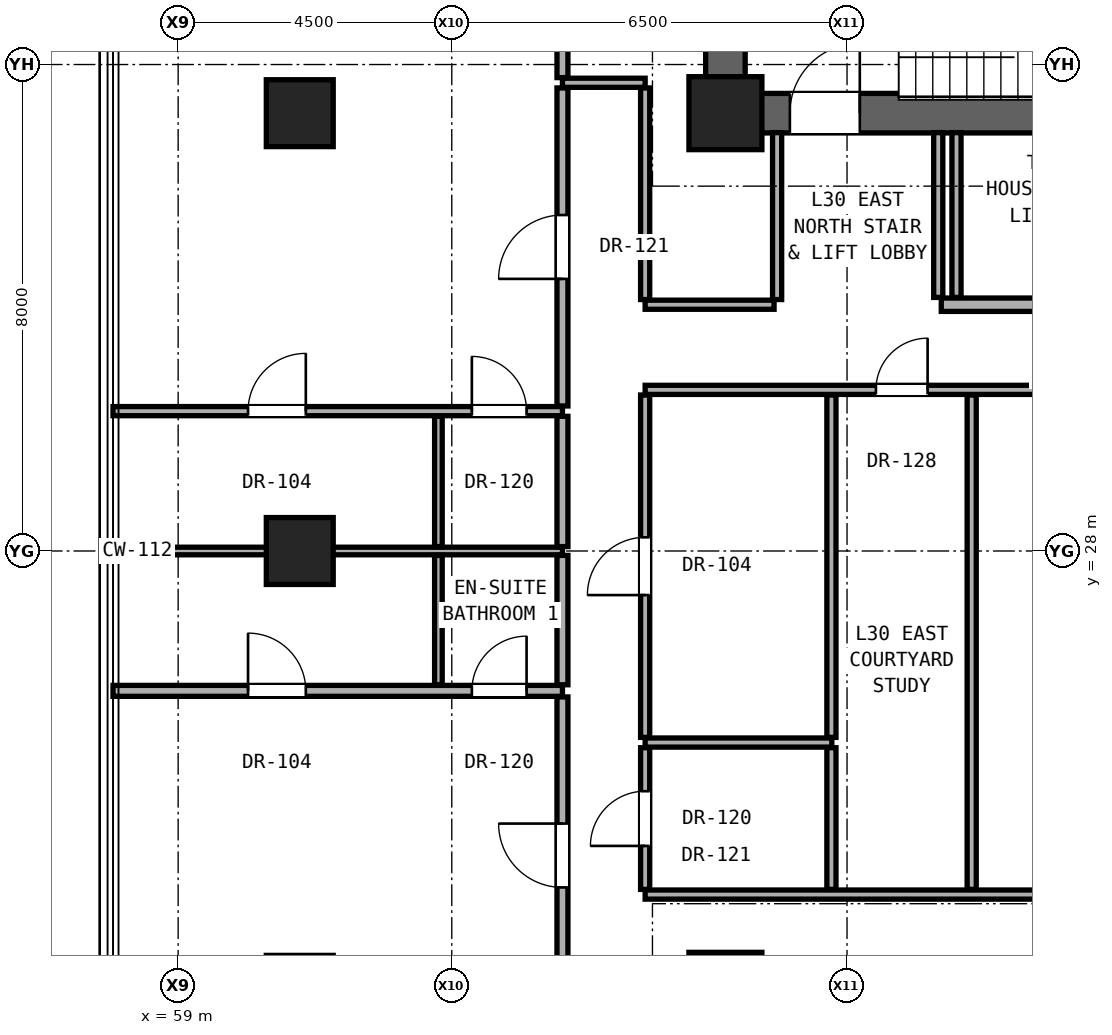
"""IFC4 building model, lengths in metres.
Left out: names, types, materials, properties, quantities, classifications, styles, units other than length and angle.
Written with IfcOpenShell. Run it as: python <this file> out.ifc"""

import sys

from ifc_helpers import new_model, si_unit, direction, frame, frame_2d, origin, origin_2d, place, context, subcontext, project, spatial, rectangle, hollow_rectangle, extrude, element, fill, save


model = new_model("IFC4")
c1 = context("Model", 3, precision=1e-05, world=origin(), true_north=direction((0.0, 1.0)))
c2 = subcontext(c1, "Body", "Model", "MODEL_VIEW")
j1 = project(units=[si_unit("LENGTHUNIT", "METRE"), si_unit("PLANEANGLEUNIT", "RADIAN")], contexts=[c1])
p1 = place(None, origin())
s1 = spatial("IfcSite", under=j1, at=p1, CompositionType="ELEMENT")
p2 = place(p1, origin())
s2 = spatial("IfcBuilding", under=s1, at=p2, CompositionType="ELEMENT")
p3 = place(p2, frame((0.0, 0.0, 108.2)))
s3 = spatial("IfcBuildingStorey", under=s2, at=p3, CompositionType="ELEMENT", Elevation=108.2)
for number, where, z_axis, x_axis in (
    (1, (68.0, 20.8, 0.0), (0.0, 0.0, 1.0), (1.0, 0.0, 0.0)),
    (2, (68.0, 35.2, 0.0), (0.0, 0.0, 1.0), (1.0, 0.0, 0.0)),
):
    element("IfcColumn", number, at=place(p3, frame(where, z_axis=z_axis, x_axis=x_axis)), inside=s3, PredefinedType="COLUMN", context=c2, shape_type="SweptSolid", body=[
        extrude(rectangle(XDim=1.2, YDim=1.2, at=origin_2d()), origin(), (0.0, 0.0, 1.0), 3.3),
    ])
for number, where, z_axis, x_axis in (
    (3, (61.0, 28.0, 0.0), (0.0, 0.0, 1.0), (1.0, 0.0, 0.0)),
    (4, (61.0, 35.2, 0.0), (0.0, 0.0, 1.0), (1.0, 0.0, 0.0)),
):
    element("IfcColumn", number, at=place(p3, frame(where, z_axis=z_axis, x_axis=x_axis)), inside=s3, PredefinedType="COLUMN", context=c2, shape_type="SweptSolid", body=[
        extrude(hollow_rectangle(XDim=1.1, YDim=1.1, WallThickness=0.06, at=origin_2d()), origin(), (0.0, 0.0, 1.0), 3.3),
    ])
p4 = place(p3, frame((68.0, 35.2, 0.0), z_axis=(0.0, 0.0, 1.0), x_axis=(0.0, 1.0, 0.0)))
e5 = element("IfcWall", 5, at=p4, inside=s3, PredefinedType="SHEAR", context=c2, shape_type="SweptSolid", body=[
    extrude(rectangle(XDim=5.6, YDim=0.65, at=frame_2d((2.8, 0.0))), origin(), (0.0, 0.0, 1.0), 3.08),
])
p5 = place(p3, frame((68.0, 35.2, 0.0), z_axis=(0.0, 0.0, 1.0), x_axis=(1.0, 0.0, 0.0)))
e6 = element("IfcWall", 6, at=p5, inside=s3, PredefinedType="SHEAR", context=c2, shape_type="SweptSolid", body=[
    extrude(rectangle(XDim=17.0, YDim=0.65, at=frame_2d((8.5, 0.0))), origin(), (0.0, 0.0, 1.0), 3.08),
])
p6 = place(p5, frame((1.06, 0.0, 0.0)))
e7 = element("IfcOpeningElement", 7, at=p6, cuts=e6, PredefinedType="OPENING", context=c2, shape_type="SweptSolid", body=[
    extrude(rectangle(XDim=1.15, YDim=2.2, at=frame_2d((0.575, 1.1))), frame((0.0, 0.335, 0.0), z_axis=(0.0, -1.0, 0.0), x_axis=(1.0, 0.0, 0.0)), (0.0, 0.0, 1.0), 0.67),
])
p7 = place(p5, frame((8.75, 0.0, 0.0)))
e8 = element("IfcOpeningElement", 8, at=p7, cuts=e6, PredefinedType="OPENING", context=c2, shape_type="SweptSolid", body=[
    extrude(rectangle(XDim=1.4, YDim=2.35, at=frame_2d((0.7, 1.175))), frame((0.0, 0.335, 0.0), z_axis=(0.0, -1.0, 0.0), x_axis=(1.0, 0.0, 0.0)), (0.0, 0.0, 1.0), 0.67),
])
p8 = place(p5, frame((10.77, 0.0, 0.0)))
e9 = element("IfcOpeningElement", 9, at=p8, cuts=e6, PredefinedType="OPENING", context=c2, shape_type="SweptSolid", body=[
    extrude(rectangle(XDim=1.3, YDim=2.3, at=frame_2d((0.65, 1.15))), frame((0.0, 0.335, 0.0), z_axis=(0.0, -1.0, 0.0), x_axis=(1.0, 0.0, 0.0)), (0.0, 0.0, 1.0), 0.67),
])
p9 = place(p3, frame((66.68, 22.35, 0.0), z_axis=(0.0, 0.0, 1.0), x_axis=(1.0, 0.0, 0.0)))
e10 = element("IfcWall", 10, at=p9, inside=s3, PredefinedType="PARTITIONING", context=c2, shape_type="SweptSolid", body=[
    extrude(rectangle(XDim=19.5, YDim=0.15, at=frame_2d((9.75, 0.0))), origin(), (0.0, 0.0, 1.0), 2.145),
])
p10 = place(p9, frame((8.053, 0.0, 0.0)))
e11 = element("IfcOpeningElement", 11, at=p10, cuts=e10, PredefinedType="OPENING", context=c2, shape_type="SweptSolid", body=[
    extrude(rectangle(XDim=0.85, YDim=2.01, at=frame_2d((0.425, 1.005))), frame((0.0, 0.085, 0.0), z_axis=(0.0, -1.0, 0.0), x_axis=(1.0, 0.0, 0.0)), (0.0, 0.0, 1.0), 0.17),
])
p11 = place(p3, frame((66.68, 24.85, 0.0), z_axis=(0.0, 0.0, 1.0), x_axis=(1.0, 0.0, 0.0)))
e12 = element("IfcWall", 12, at=p11, inside=s3, PredefinedType="PARTITIONING", context=c2, shape_type="SweptSolid", body=[
    extrude(rectangle(XDim=3.07, YDim=0.15, at=frame_2d((1.535, 0.0))), origin(), (0.0, 0.0, 1.0), 2.145),
])
p12 = place(p3, frame((57.929, 25.7, 0.0), z_axis=(0.0, 0.0, 1.0), x_axis=(1.0, 0.0, 0.0)))
e13 = element("IfcWall", 13, at=p12, inside=s3, PredefinedType="PARTITIONING", context=c2, shape_type="SweptSolid", body=[
    extrude(rectangle(XDim=7.391, YDim=0.18, at=frame_2d((3.696, 0.0))), origin(), (0.0, 0.0, 1.0), 2.216),
])
p13 = place(p12, frame((2.22, 0.0, 0.0)))
e14 = element("IfcOpeningElement", 14, at=p13, cuts=e13, PredefinedType="OPENING", context=c2, shape_type="SweptSolid", body=[
    extrude(rectangle(XDim=0.95, YDim=2.15, at=frame_2d((0.475, 1.075))), frame((0.0, 0.1, 0.0), z_axis=(0.0, -1.0, 0.0), x_axis=(1.0, 0.0, 0.0)), (0.0, 0.0, 1.0), 0.2),
])
p14 = place(p12, frame((5.901, 0.0, 0.0)))
e15 = element("IfcOpeningElement", 15, at=p14, cuts=e13, PredefinedType="OPENING", context=c2, shape_type="SweptSolid", body=[
    extrude(rectangle(XDim=0.9, YDim=2.1, at=frame_2d((0.45, 1.05))), frame((0.0, 0.1, 0.0), z_axis=(0.0, -1.0, 0.0), x_axis=(1.0, 0.0, 0.0)), (0.0, 0.0, 1.0), 0.2),
])
p15 = place(p3, frame((57.929, 28.0, 0.0), z_axis=(0.0, 0.0, 1.0), x_axis=(1.0, 0.0, 0.0)))
e16 = element("IfcWall", 16, at=p15, inside=s3, PredefinedType="PARTITIONING", context=c2, shape_type="SweptSolid", body=[
    extrude(rectangle(XDim=7.391, YDim=0.125, at=frame_2d((3.696, 0.0))), origin(), (0.0, 0.0, 1.0), 2.216),
])
p16 = place(p3, frame((57.929, 30.3, 0.0), z_axis=(0.0, 0.0, 1.0), x_axis=(1.0, 0.0, 0.0)))
e17 = element("IfcWall", 17, at=p16, inside=s3, PredefinedType="PARTITIONING", context=c2, shape_type="SweptSolid", body=[
    extrude(rectangle(XDim=7.391, YDim=0.15, at=frame_2d((3.696, 0.0))), origin(), (0.0, 0.0, 1.0), 2.216),
])
p17 = place(p16, frame((2.22, 0.0, 0.0)))
e18 = element("IfcOpeningElement", 18, at=p17, cuts=e17, PredefinedType="OPENING", context=c2, shape_type="SweptSolid", body=[
    extrude(rectangle(XDim=0.95, YDim=2.15, at=frame_2d((0.475, 1.075))), frame((0.0, 0.085, 0.0), z_axis=(0.0, -1.0, 0.0), x_axis=(1.0, 0.0, 0.0)), (0.0, 0.0, 1.0), 0.17),
])
p18 = place(p16, frame((5.901, 0.0, 0.0)))
e19 = element("IfcOpeningElement", 19, at=p18, cuts=e17, PredefinedType="OPENING", context=c2, shape_type="SweptSolid", body=[
    extrude(rectangle(XDim=0.9, YDim=2.1, at=frame_2d((0.45, 1.05))), frame((0.0, 0.085, 0.0), z_axis=(0.0, -1.0, 0.0), x_axis=(1.0, 0.0, 0.0)), (0.0, 0.0, 1.0), 0.17),
])
p19 = place(p3, frame((66.68, 30.65, 0.0), z_axis=(0.0, 0.0, 1.0), x_axis=(1.0, 0.0, 0.0)))
e20 = element("IfcWall", 20, at=p19, inside=s3, PredefinedType="PARTITIONING", context=c2, shape_type="SweptSolid", body=[
    extrude(rectangle(XDim=19.5, YDim=0.15, at=frame_2d((9.75, 0.0))), origin(), (0.0, 0.0, 1.0), 2.145),
])
p20 = place(p19, frame((3.795, 0.0, 0.0)))
e21 = element("IfcOpeningElement", 21, at=p20, cuts=e20, PredefinedType="OPENING", context=c2, shape_type="SweptSolid", body=[
    extrude(rectangle(XDim=0.85, YDim=2.01, at=frame_2d((0.425, 1.005))), frame((0.0, 0.085, 0.0), z_axis=(0.0, -1.0, 0.0), x_axis=(1.0, 0.0, 0.0)), (0.0, 0.0, 1.0), 0.17),
])
p21 = place(p19, frame((15.098, 0.0, 0.0)))
e22 = element("IfcOpeningElement", 22, at=p21, cuts=e20, PredefinedType="OPENING", context=c2, shape_type="SweptSolid", body=[
    extrude(rectangle(XDim=0.85, YDim=2.01, at=frame_2d((0.425, 1.005))), frame((0.0, 0.085, 0.0), z_axis=(0.0, -1.0, 0.0), x_axis=(1.0, 0.0, 0.0)), (0.0, 0.0, 1.0), 0.17),
])
p22 = place(p3, frame((66.68, 32.05, 0.0), z_axis=(0.0, 0.0, 1.0), x_axis=(1.0, 0.0, 0.0)))
e23 = element("IfcWall", 23, at=p22, inside=s3, PredefinedType="PARTITIONING", context=c2, shape_type="SweptSolid", body=[
    extrude(rectangle(XDim=2.12, YDim=0.15, at=frame_2d((1.06, 0.0))), origin(), (0.0, 0.0, 1.0), 2.145),
])
p23 = place(p3, frame((71.55, 32.05, 0.0), z_axis=(0.0, 0.0, 1.0), x_axis=(1.0, 0.0, 0.0)))
e24 = element("IfcWall", 24, at=p23, inside=s3, PredefinedType="SOLIDWALL", context=c2, shape_type="SweptSolid", body=[
    extrude(rectangle(XDim=14.63, YDim=0.22, at=frame_2d((7.315, 0.0))), origin(), (0.0, 0.0, 1.0), 2.145),
])
p24 = place(p23, frame((6.065, 0.0, 0.0)))
e25 = element("IfcOpeningElement", 25, at=p24, cuts=e24, PredefinedType="OPENING", context=c2, shape_type="SweptSolid", body=[
    extrude(rectangle(XDim=0.85, YDim=2.01, at=frame_2d((0.425, 1.005))), frame((0.0, 0.12, 0.0), z_axis=(0.0, -1.0, 0.0), x_axis=(1.0, 0.0, 0.0)), (0.0, 0.0, 1.0), 0.24),
])
p25 = place(p23, frame((10.585, 0.0, 0.0)))
e26 = element("IfcOpeningElement", 26, at=p25, cuts=e24, PredefinedType="OPENING", context=c2, shape_type="SweptSolid", body=[
    extrude(rectangle(XDim=0.85, YDim=2.01, at=frame_2d((0.425, 1.005))), frame((0.0, 0.12, 0.0), z_axis=(0.0, -1.0, 0.0), x_axis=(1.0, 0.0, 0.0)), (0.0, 0.0, 1.0), 0.24),
])
p26 = place(p23, frame((1.65, 0.0, 0.0)))
e27 = element("IfcOpeningElement", 27, at=p26, cuts=e24, PredefinedType="OPENING", context=c2, shape_type="SweptSolid", body=[
    extrude(rectangle(XDim=0.85, YDim=2.01, at=frame_2d((0.425, 1.005))), frame((0.0, 0.12, 0.0), z_axis=(0.0, -1.0, 0.0), x_axis=(1.0, 0.0, 0.0)), (0.0, 0.0, 1.0), 0.24),
])
p27 = place(p3, frame((65.32, 35.7, 0.0), z_axis=(0.0, 0.0, 1.0), x_axis=(1.0, 0.0, 0.0)))
e28 = element("IfcWall", 28, at=p27, inside=s3, PredefinedType="PARTITIONING", context=c2, shape_type="SweptSolid", body=[
    extrude(rectangle(XDim=1.36, YDim=0.15, at=frame_2d((0.68, 0.0))), origin(), (0.0, 0.0, 1.0), 3.08),
])
p28 = place(p3, frame((63.28, 25.8, 0.0), z_axis=(0.0, 0.0, 1.0), x_axis=(0.0, 1.0, 0.0)))
e29 = element("IfcWall", 29, at=p28, inside=s3, PredefinedType="PARTITIONING", context=c2, shape_type="SweptSolid", body=[
    extrude(rectangle(XDim=2.127, YDim=0.125, at=frame_2d((1.064, 0.0))), origin(), (0.0, 0.0, 1.0), 2.299),
])
p29 = place(p3, frame((63.28, 28.073, 0.0), z_axis=(0.0, 0.0, 1.0), x_axis=(0.0, 1.0, 0.0)))
e30 = element("IfcWall", 30, at=p29, inside=s3, PredefinedType="PARTITIONING", context=c2, shape_type="SweptSolid", body=[
    extrude(rectangle(XDim=2.143, YDim=0.125, at=frame_2d((1.071, 0.0))), origin(), (0.0, 0.0, 1.0), 2.299),
])
p30 = place(p3, frame((65.32, 20.385, 0.0), z_axis=(0.0, 0.0, 1.0), x_axis=(0.0, 1.0, 0.0)))
e31 = element("IfcWall", 31, at=p30, inside=s3, PredefinedType="PARTITIONING", context=c2, shape_type="SweptSolid", body=[
    extrude(rectangle(XDim=5.215, YDim=0.18, at=frame_2d((2.607, 0.0))), origin(), (0.0, 0.0, 1.0), 2.472),
])
p31 = place(p30, frame((2.083, 0.0, 0.0)))
e32 = element("IfcOpeningElement", 32, at=p31, cuts=e31, PredefinedType="OPENING", context=c2, shape_type="SweptSolid", body=[
    extrude(rectangle(XDim=1.05, YDim=2.2, at=frame_2d((0.525, 1.1))), frame((0.0, 0.1, 0.0), z_axis=(0.0, -1.0, 0.0), x_axis=(1.0, 0.0, 0.0)), (0.0, 0.0, 1.0), 0.2),
])
p32 = place(p3, frame((65.32, 25.8, 0.0), z_axis=(0.0, 0.0, 1.0), x_axis=(0.0, 1.0, 0.0)))
e33 = element("IfcWall", 33, at=p32, inside=s3, PredefinedType="PARTITIONING", context=c2, shape_type="SweptSolid", body=[
    extrude(rectangle(XDim=2.127, YDim=0.18, at=frame_2d((1.064, 0.0))), origin(), (0.0, 0.0, 1.0), 2.299),
])
p33 = place(p3, frame((65.32, 28.073, 0.0), z_axis=(0.0, 0.0, 1.0), x_axis=(0.0, 1.0, 0.0)))
e34 = element("IfcWall", 34, at=p33, inside=s3, PredefinedType="PARTITIONING", context=c2, shape_type="SweptSolid", body=[
    extrude(rectangle(XDim=2.143, YDim=0.18, at=frame_2d((1.071, 0.0))), origin(), (0.0, 0.0, 1.0), 2.299),
])
p34 = place(p3, frame((65.32, 30.385, 0.0), z_axis=(0.0, 0.0, 1.0), x_axis=(0.0, 1.0, 0.0)))
e35 = element("IfcWall", 35, at=p34, inside=s3, PredefinedType="PARTITIONING", context=c2, shape_type="SweptSolid", body=[
    extrude(rectangle(XDim=5.23, YDim=0.18, at=frame_2d((2.615, 0.0))), origin(), (0.0, 0.0, 1.0), 2.472),
])
p35 = place(p34, frame((2.09, 0.0, 0.0)))
e36 = element("IfcOpeningElement", 36, at=p35, cuts=e35, PredefinedType="OPENING", context=c2, shape_type="SweptSolid", body=[
    extrude(rectangle(XDim=1.05, YDim=2.2, at=frame_2d((0.525, 1.1))), frame((0.0, 0.1, 0.0), z_axis=(0.0, -1.0, 0.0), x_axis=(1.0, 0.0, 0.0)), (0.0, 0.0, 1.0), 0.2),
])
p36 = place(p3, frame((65.32, 35.785, 0.0), z_axis=(0.0, 0.0, 1.0), x_axis=(0.0, 1.0, 0.0)))
e37 = element("IfcWall", 37, at=p36, inside=s3, PredefinedType="PARTITIONING", context=c2, shape_type="SweptSolid", body=[
    extrude(rectangle(XDim=3.711, YDim=0.18, at=frame_2d((1.855, 0.0))), origin(), (0.0, 0.0, 1.0), 2.456),
])
p37 = place(p3, frame((66.68, 22.435, 0.0), z_axis=(0.0, 0.0, 1.0), x_axis=(0.0, 1.0, 0.0)))
e38 = element("IfcWall", 38, at=p37, inside=s3, PredefinedType="PARTITIONING", context=c2, shape_type="SweptSolid", body=[
    extrude(rectangle(XDim=2.33, YDim=0.15, at=frame_2d((1.165, 0.0))), origin(), (0.0, 0.0, 1.0), 3.08),
])
p38 = place(p37, frame((0.715, 0.0, 0.0)))
e39 = element("IfcOpeningElement", 39, at=p38, cuts=e38, PredefinedType="OPENING", context=c2, shape_type="SweptSolid", body=[
    extrude(rectangle(XDim=0.9, YDim=2.1, at=frame_2d((0.45, 1.05))), frame((0.0, 0.085, 0.0), z_axis=(0.0, -1.0, 0.0), x_axis=(1.0, 0.0, 0.0)), (0.0, 0.0, 1.0), 0.17),
])
p39 = place(p3, frame((66.68, 24.935, 0.0), z_axis=(0.0, 0.0, 1.0), x_axis=(0.0, 1.0, 0.0)))
e40 = element("IfcWall", 40, at=p39, inside=s3, PredefinedType="PARTITIONING", context=c2, shape_type="SweptSolid", body=[
    extrude(rectangle(XDim=5.63, YDim=0.15, at=frame_2d((2.815, 0.0))), origin(), (0.0, 0.0, 1.0), 2.299),
])
p40 = place(p39, frame((2.34, 0.0, 0.0)))
e41 = element("IfcOpeningElement", 41, at=p40, cuts=e40, PredefinedType="OPENING", context=c2, shape_type="SweptSolid", body=[
    extrude(rectangle(XDim=0.95, YDim=2.15, at=frame_2d((0.475, 1.075))), frame((0.0, 0.085, 0.0), z_axis=(0.0, -1.0, 0.0), x_axis=(1.0, 0.0, 0.0)), (0.0, 0.0, 1.0), 0.17),
])
p41 = place(p3, frame((66.68, 32.135, 0.0), z_axis=(0.0, 0.0, 1.0), x_axis=(0.0, 1.0, 0.0)))
e42 = element("IfcWall", 42, at=p41, inside=s3, PredefinedType="PARTITIONING", context=c2, shape_type="SweptSolid", body=[
    extrude(rectangle(XDim=3.48, YDim=0.15, at=frame_2d((1.74, 0.0))), origin(), (0.0, 0.0, 1.0), 2.472),
])
p42 = place(p3, frame((68.85, 32.135, 0.0), z_axis=(0.0, 0.0, 1.0), x_axis=(0.0, 1.0, 0.0)))
e43 = element("IfcWall", 43, at=p42, inside=s3, PredefinedType="PARTITIONING", context=c2, shape_type="SweptSolid", body=[
    extrude(rectangle(XDim=2.745, YDim=0.15, at=frame_2d((1.373, 0.0))), origin(), (0.0, 0.0, 1.0), 3.08),
])
p43 = place(p3, frame((69.743, 22.435, 0.0), z_axis=(0.0, 0.0, 1.0), x_axis=(0.0, 1.0, 0.0)))
e44 = element("IfcWall", 44, at=p43, inside=s3, PredefinedType="PARTITIONING", context=c2, shape_type="SweptSolid", body=[
    extrude(rectangle(XDim=2.33, YDim=0.15, at=frame_2d((1.165, 0.0))), origin(), (0.0, 0.0, 1.0), 3.08),
])
p44 = place(p3, frame((69.743, 24.935, 0.0), z_axis=(0.0, 0.0, 1.0), x_axis=(0.0, 1.0, 0.0)))
e45 = element("IfcWall", 45, at=p44, inside=s3, PredefinedType="PARTITIONING", context=c2, shape_type="SweptSolid", body=[
    extrude(rectangle(XDim=5.63, YDim=0.15, at=frame_2d((2.815, 0.0))), origin(), (0.0, 0.0, 1.0), 2.145),
])
for number, where, z_axis, x_axis in (
    (46, (71.5, 32.17, 0.0), (0.0, 0.0, 1.0), (0.0, 1.0, 0.0)),
    (47, (71.8, 32.17, 0.0), (0.0, 0.0, 1.0), (0.0, 1.0, 0.0)),
):
    element("IfcWall", number, at=place(p3, frame(where, z_axis=z_axis, x_axis=x_axis)), inside=s3, PredefinedType="PARTITIONING", context=c2, shape_type="SweptSolid", body=[
        extrude(rectangle(XDim=2.71, YDim=0.15, at=frame_2d((1.355, 0.0))), origin(), (0.0, 0.0, 1.0), 3.08),
    ])
p45 = place(p3, frame((72.05, 22.435, 0.0), z_axis=(0.0, 0.0, 1.0), x_axis=(0.0, 1.0, 0.0)))
e48 = element("IfcWall", 48, at=p45, inside=s3, PredefinedType="PARTITIONING", context=c2, shape_type="SweptSolid", body=[
    extrude(rectangle(XDim=8.13, YDim=0.15, at=frame_2d((4.065, 0.0))), origin(), (0.0, 0.0, 1.0), 2.145),
])
p46 = place(p6, origin())
e49 = element("IfcDoor", 49, at=p46, inside=s3, OperationType="SINGLE_SWING_RIGHT", PredefinedType="DOOR", context=c2, shape_type="SweptSolid", body=[
    extrude(rectangle(XDim=1.15, YDim=2.2, at=frame_2d((0.575, 1.1))), frame((0.0, 0.025, 0.0), z_axis=(0.0, -1.0, 0.0), x_axis=(1.0, 0.0, 0.0)), (0.0, 0.0, 1.0), 0.05),
])
fill(e7, e49)
p47 = place(p38, origin())
e50 = element("IfcDoor", 50, at=p47, inside=s3, OperationType="SINGLE_SWING_LEFT", PredefinedType="DOOR", context=c2, shape_type="SweptSolid", body=[
    extrude(rectangle(XDim=0.9, YDim=2.1, at=frame_2d((0.45, 1.05))), frame((0.0, 0.025, 0.0), z_axis=(0.0, -1.0, 0.0), x_axis=(1.0, 0.0, 0.0)), (0.0, 0.0, 1.0), 0.05),
])
fill(e39, e50)
p48 = place(p31, origin())
e51 = element("IfcDoor", 51, at=p48, inside=s3, OperationType="SINGLE_SWING_RIGHT", PredefinedType="DOOR", context=c2, shape_type="SweptSolid", body=[
    extrude(rectangle(XDim=1.05, YDim=2.2, at=frame_2d((0.525, 1.1))), frame((0.0, 0.025, 0.0), z_axis=(0.0, -1.0, 0.0), x_axis=(1.0, 0.0, 0.0)), (0.0, 0.0, 1.0), 0.05),
])
fill(e32, e51)
p49 = place(p13, origin())
e52 = element("IfcDoor", 52, at=p49, inside=s3, OperationType="SINGLE_SWING_LEFT", PredefinedType="DOOR", context=c2, shape_type="SweptSolid", body=[
    extrude(rectangle(XDim=0.95, YDim=2.15, at=frame_2d((0.475, 1.075))), frame((0.0, 0.025, 0.0), z_axis=(0.0, -1.0, 0.0), x_axis=(1.0, 0.0, 0.0)), (0.0, 0.0, 1.0), 0.05),
])
fill(e14, e52)
p50 = place(p14, origin())
e53 = element("IfcDoor", 53, at=p50, inside=s3, OperationType="SINGLE_SWING_RIGHT", PredefinedType="DOOR", context=c2, shape_type="SweptSolid", body=[
    extrude(rectangle(XDim=0.9, YDim=2.1, at=frame_2d((0.45, 1.05))), frame((0.0, 0.025, 0.0), z_axis=(0.0, -1.0, 0.0), x_axis=(1.0, 0.0, 0.0)), (0.0, 0.0, 1.0), 0.05),
])
fill(e15, e53)
p51 = place(p35, origin())
e54 = element("IfcDoor", 54, at=p51, inside=s3, OperationType="SINGLE_SWING_LEFT", PredefinedType="DOOR", context=c2, shape_type="SweptSolid", body=[
    extrude(rectangle(XDim=1.05, YDim=2.2, at=frame_2d((0.525, 1.1))), frame((0.0, 0.025, 0.0), z_axis=(0.0, -1.0, 0.0), x_axis=(1.0, 0.0, 0.0)), (0.0, 0.0, 1.0), 0.05),
])
fill(e36, e54)
p52 = place(p17, origin())
e55 = element("IfcDoor", 55, at=p52, inside=s3, OperationType="SINGLE_SWING_RIGHT", PredefinedType="DOOR", context=c2, shape_type="SweptSolid", body=[
    extrude(rectangle(XDim=0.95, YDim=2.15, at=frame_2d((0.475, 1.075))), frame((0.0, 0.025, 0.0), z_axis=(0.0, -1.0, 0.0), x_axis=(1.0, 0.0, 0.0)), (0.0, 0.0, 1.0), 0.05),
])
fill(e18, e55)
p53 = place(p18, origin())
e56 = element("IfcDoor", 56, at=p53, inside=s3, OperationType="SINGLE_SWING_LEFT", PredefinedType="DOOR", context=c2, shape_type="SweptSolid", body=[
    extrude(rectangle(XDim=0.9, YDim=2.1, at=frame_2d((0.45, 1.05))), frame((0.0, 0.025, 0.0), z_axis=(0.0, -1.0, 0.0), x_axis=(1.0, 0.0, 0.0)), (0.0, 0.0, 1.0), 0.05),
])
fill(e19, e56)
p54 = place(p40, origin())
e57 = element("IfcDoor", 57, at=p54, inside=s3, OperationType="SINGLE_SWING_LEFT", PredefinedType="DOOR", context=c2, shape_type="SweptSolid", body=[
    extrude(rectangle(XDim=0.95, YDim=2.15, at=frame_2d((0.475, 1.075))), frame((0.0, 0.025, 0.0), z_axis=(0.0, -1.0, 0.0), x_axis=(1.0, 0.0, 0.0)), (0.0, 0.0, 1.0), 0.05),
])
fill(e41, e57)
p55 = place(p20, origin())
e58 = element("IfcDoor", 58, at=p55, inside=s3, OperationType="SINGLE_SWING_RIGHT", PredefinedType="DOOR", context=c2, shape_type="SweptSolid", body=[
    extrude(rectangle(XDim=0.85, YDim=2.01, at=frame_2d((0.425, 1.005))), frame((0.0, 0.025, 0.0), z_axis=(0.0, -1.0, 0.0), x_axis=(1.0, 0.0, 0.0)), (0.0, 0.0, 1.0), 0.05),
])
fill(e21, e58)
save(model, sys.argv[1])
